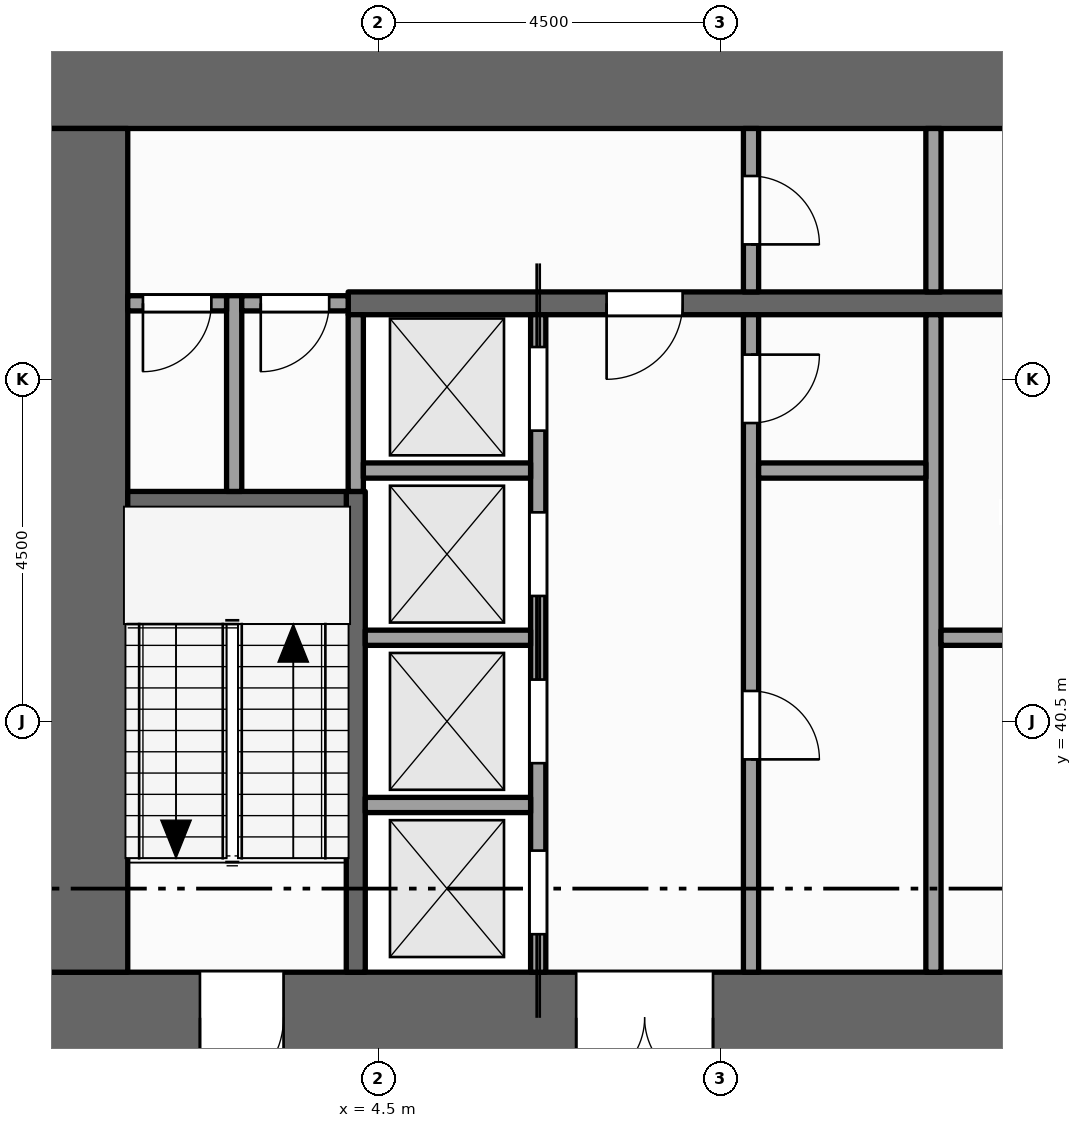
"""IFC4 building model, lengths in metres.
Left out: names, types, materials, properties, quantities, classifications, styles, units other than length and angle.
Written with IfcOpenShell. Run it as: python <this file> out.ifc"""

import sys

from ifc_helpers import new_model, si_unit, direction, frame, frame_2d, origin, place, context, subcontext, project, spatial, rectangle, extrude, element, fill, save


model = new_model("IFC4")
c1 = context("Model", 3, precision=1e-05, world=origin(), true_north=direction((0.0, 1.0)))
c2 = subcontext(c1, "Body", "Model", "MODEL_VIEW")
j1 = project(units=[si_unit("LENGTHUNIT", "METRE"), si_unit("PLANEANGLEUNIT", "RADIAN")], contexts=[c1])
p1 = place(None, origin())
s1 = spatial("IfcSite", under=j1, at=p1, CompositionType="ELEMENT")
p2 = place(p1, origin())
s2 = spatial("IfcBuilding", under=s1, at=p2, CompositionType="ELEMENT")
p3 = place(p2, frame((0.0, 0.0, 123.0)))
s3 = spatial("IfcBuildingStorey", under=s2, at=p3, CompositionType="ELEMENT", Elevation=123.0)
p4 = place(p3, frame((0.0, 36.6, -0.15), z_axis=(0.0, 0.0, 1.0), x_axis=(1.0, 0.0, 0.0)))
e1 = element("IfcWall", 1, at=p4, inside=s3, PredefinedType="SHEAR", context=c2, shape_type="SweptSolid", body=[
    extrude(rectangle(XDim=22.5, YDim=1.2, at=frame_2d((11.25, 0.0))), origin(), (0.0, 0.0, 1.0), 4.0),
])
p5 = place(p4, frame((7.1, 0.0, 0.15)))
e2 = element("IfcOpeningElement", 2, at=p5, cuts=e1, PredefinedType="OPENING", context=c2, shape_type="SweptSolid", body=[
    extrude(rectangle(XDim=1.8, YDim=2.1, at=frame_2d((0.9, 1.05))), frame((0.0, 0.61, 0.0), z_axis=(0.0, -1.0, 0.0), x_axis=(1.0, 0.0, 0.0)), (0.0, 0.0, 1.0), 1.22),
])
p6 = place(p4, frame((13.15, 0.0, 0.15)))
e3 = element("IfcOpeningElement", 3, at=p6, cuts=e1, PredefinedType="OPENING", context=c2, shape_type="SweptSolid", body=[
    extrude(rectangle(XDim=1.1, YDim=2.1, at=frame_2d((0.55, 1.05))), frame((0.0, 0.61, 0.0), z_axis=(0.0, -1.0, 0.0), x_axis=(1.0, 0.0, 0.0)), (0.0, 0.0, 1.0), 1.22),
])
p7 = place(p4, frame((2.15, 0.0, 0.15)))
e4 = element("IfcOpeningElement", 4, at=p7, cuts=e1, PredefinedType="OPENING", context=c2, shape_type="SweptSolid", body=[
    extrude(rectangle(XDim=1.1, YDim=2.1, at=frame_2d((0.55, 1.05))), frame((0.0, 0.61, 0.0), z_axis=(0.0, -1.0, 0.0), x_axis=(1.0, 0.0, 0.0)), (0.0, 0.0, 1.0), 1.22),
])
p8 = place(p4, frame((19.35, 0.0, 0.15)))
e5 = element("IfcOpeningElement", 5, at=p8, cuts=e1, PredefinedType="OPENING", context=c2, shape_type="SweptSolid", body=[
    extrude(rectangle(XDim=1.1, YDim=2.1, at=frame_2d((0.55, 1.05))), frame((0.0, 0.61, 0.0), z_axis=(0.0, -1.0, 0.0), x_axis=(1.0, 0.0, 0.0)), (0.0, 0.0, 1.0), 1.22),
])
p9 = place(p3, frame((0.0, 48.9, -0.15), z_axis=(0.0, 0.0, 1.0), x_axis=(1.0, 0.0, 0.0)))
e6 = element("IfcWall", 6, at=p9, inside=s3, PredefinedType="SHEAR", context=c2, shape_type="SweptSolid", body=[
    extrude(rectangle(XDim=22.5, YDim=1.2, at=frame_2d((11.25, 0.0))), origin(), (0.0, 0.0, 1.0), 4.0),
])
p10 = place(p3, frame((0.6, 37.2, -0.15), z_axis=(0.0, 0.0, 1.0), x_axis=(0.0, 1.0, 0.0)))
e7 = element("IfcWall", 7, at=p10, inside=s3, PredefinedType="SHEAR", context=c2, shape_type="SweptSolid", body=[
    extrude(rectangle(XDim=11.1, YDim=1.2, at=frame_2d((5.55, 0.0))), origin(), (0.0, 0.0, 1.0), 4.0),
])
p11 = place(p3, frame((2.6, 43.525, 0.0), z_axis=(0.0, 0.0, 1.0), x_axis=(0.0, 1.0, 0.0)))
e8 = element("IfcWall", 8, at=p11, inside=s3, PredefinedType="PARTITIONING", context=c2, shape_type="SweptSolid", body=[
    extrude(rectangle(XDim=2.575, YDim=0.2, at=frame_2d((1.288, 0.0))), origin(), (0.0, 0.0, 1.0), 3.85),
])
p12 = place(p3, frame((4.2, 37.2, 0.0), z_axis=(0.0, 0.0, 1.0), x_axis=(0.0, 1.0, 0.0)))
e9 = element("IfcWall", 9, at=p12, inside=s3, PredefinedType="SHEAR", context=c2, shape_type="SweptSolid", body=[
    extrude(rectangle(XDim=6.325, YDim=0.25, at=frame_2d((3.163, 0.0))), origin(), (0.0, 0.0, 1.0), 3.85),
])
p13 = place(p3, frame((4.2, 43.525, 0.0), z_axis=(0.0, 0.0, 1.0), x_axis=(0.0, 1.0, 0.0)))
e10 = element("IfcWall", 10, at=p13, inside=s3, PredefinedType="SOLIDWALL", context=c2, shape_type="SweptSolid", body=[
    extrude(rectangle(XDim=2.325, YDim=0.2, at=frame_2d((1.163, 0.0))), origin(), (0.0, 0.0, 1.0), 3.85),
])
p14 = place(p3, frame((6.6, 37.2, 0.0), z_axis=(0.0, 0.0, 1.0), x_axis=(0.0, 1.0, 0.0)))
e11 = element("IfcWall", 11, at=p14, inside=s3, PredefinedType="SOLIDWALL", context=c2, shape_type="SweptSolid", body=[
    extrude(rectangle(XDim=8.65, YDim=0.2, at=frame_2d((4.325, 0.0))), origin(), (0.0, 0.0, 1.0), 3.85),
])
p15 = place(p14, frame((0.5, 0.0, 0.012)))
e12 = element("IfcOpeningElement", 12, at=p15, cuts=e11, PredefinedType="OPENING", context=c2, shape_type="SweptSolid", body=[
    extrude(rectangle(XDim=1.1, YDim=2.1, at=frame_2d((0.55, 1.05))), frame((0.0, 0.11, 0.0), z_axis=(0.0, -1.0, 0.0), x_axis=(1.0, 0.0, 0.0)), (0.0, 0.0, 1.0), 0.22),
])
p16 = place(p14, frame((2.75, 0.0, 0.012)))
e13 = element("IfcOpeningElement", 13, at=p16, cuts=e11, PredefinedType="OPENING", context=c2, shape_type="SweptSolid", body=[
    extrude(rectangle(XDim=1.1, YDim=2.1, at=frame_2d((0.55, 1.05))), frame((0.0, 0.11, 0.0), z_axis=(0.0, -1.0, 0.0), x_axis=(1.0, 0.0, 0.0)), (0.0, 0.0, 1.0), 0.22),
])
p17 = place(p14, frame((4.95, 0.0, 0.012)))
e14 = element("IfcOpeningElement", 14, at=p17, cuts=e11, PredefinedType="OPENING", context=c2, shape_type="SweptSolid", body=[
    extrude(rectangle(XDim=1.1, YDim=2.1, at=frame_2d((0.55, 1.05))), frame((0.0, 0.11, 0.0), z_axis=(0.0, -1.0, 0.0), x_axis=(1.0, 0.0, 0.0)), (0.0, 0.0, 1.0), 0.22),
])
p18 = place(p14, frame((7.125, 0.0, 0.012)))
e15 = element("IfcOpeningElement", 15, at=p18, cuts=e11, PredefinedType="OPENING", context=c2, shape_type="SweptSolid", body=[
    extrude(rectangle(XDim=1.1, YDim=2.1, at=frame_2d((0.55, 1.05))), frame((0.0, 0.11, 0.0), z_axis=(0.0, -1.0, 0.0), x_axis=(1.0, 0.0, 0.0)), (0.0, 0.0, 1.0), 0.22),
])
p19 = place(p3, frame((9.4, 37.2, 0.0), z_axis=(0.0, 0.0, 1.0), x_axis=(0.0, 1.0, 0.0)))
e16 = element("IfcWall", 16, at=p19, inside=s3, PredefinedType="PARTITIONING", context=c2, shape_type="SweptSolid", body=[
    extrude(rectangle(XDim=8.65, YDim=0.2, at=frame_2d((4.325, 0.0))), origin(), (0.0, 0.0, 1.0), 3.85),
])
p20 = place(p19, frame((2.8, 0.0, 0.0)))
e17 = element("IfcOpeningElement", 17, at=p20, cuts=e16, PredefinedType="OPENING", context=c2, shape_type="SweptSolid", body=[
    extrude(rectangle(XDim=0.9, YDim=2.1, at=frame_2d((0.45, 1.05))), frame((0.0, 0.11, 0.0), z_axis=(0.0, -1.0, 0.0), x_axis=(1.0, 0.0, 0.0)), (0.0, 0.0, 1.0), 0.22),
])
p21 = place(p19, frame((7.225, 0.0, 0.0)))
e18 = element("IfcOpeningElement", 18, at=p21, cuts=e16, PredefinedType="OPENING", context=c2, shape_type="SweptSolid", body=[
    extrude(rectangle(XDim=0.9, YDim=2.1, at=frame_2d((0.45, 1.05))), frame((0.0, 0.11, 0.0), z_axis=(0.0, -1.0, 0.0), x_axis=(1.0, 0.0, 0.0)), (0.0, 0.0, 1.0), 0.22),
])
p22 = place(p3, frame((9.4, 46.15, 0.0), z_axis=(0.0, 0.0, 1.0), x_axis=(0.0, 1.0, 0.0)))
e19 = element("IfcWall", 19, at=p22, inside=s3, PredefinedType="PARTITIONING", context=c2, shape_type="SweptSolid", body=[
    extrude(rectangle(XDim=2.15, YDim=0.2, at=frame_2d((1.075, 0.0))), origin(), (0.0, 0.0, 1.0), 3.85),
])
p23 = place(p22, frame((0.625, 0.0, 0.0)))
e20 = element("IfcOpeningElement", 20, at=p23, cuts=e19, PredefinedType="OPENING", context=c2, shape_type="SweptSolid", body=[
    extrude(rectangle(XDim=0.9, YDim=2.1, at=frame_2d((0.45, 1.05))), frame((0.0, 0.11, 0.0), z_axis=(0.0, -1.0, 0.0), x_axis=(1.0, 0.0, 0.0)), (0.0, 0.0, 1.0), 0.22),
])
p24 = place(p3, frame((11.8, 37.2, 0.0), z_axis=(0.0, 0.0, 1.0), x_axis=(0.0, 1.0, 0.0)))
e21 = element("IfcWall", 21, at=p24, inside=s3, PredefinedType="PARTITIONING", context=c2, shape_type="SweptSolid", body=[
    extrude(rectangle(XDim=8.65, YDim=0.2, at=frame_2d((4.325, 0.0))), origin(), (0.0, 0.0, 1.0), 3.85),
])
p25 = place(p3, frame((11.8, 46.15, 0.0), z_axis=(0.0, 0.0, 1.0), x_axis=(0.0, 1.0, 0.0)))
e22 = element("IfcWall", 22, at=p25, inside=s3, PredefinedType="PARTITIONING", context=c2, shape_type="SweptSolid", body=[
    extrude(rectangle(XDim=2.15, YDim=0.2, at=frame_2d((1.075, 0.0))), origin(), (0.0, 0.0, 1.0), 3.85),
])
for number, where, z_axis, x_axis in (
    (23, (4.325, 39.4, 0.0), (0.0, 0.0, 1.0), (1.0, 0.0, 0.0)),
    (24, (4.325, 41.6, 0.0), (0.0, 0.0, 1.0), (1.0, 0.0, 0.0)),
):
    element("IfcWall", number, at=place(p3, frame(where, z_axis=z_axis, x_axis=x_axis)), inside=s3, PredefinedType="SOLIDWALL", context=c2, shape_type="SweptSolid", body=[
        extrude(rectangle(XDim=2.175, YDim=0.2, at=frame_2d((1.087, 0.0))), origin(), (0.0, 0.0, 1.0), 3.85),
    ])
p26 = place(p3, frame((11.9, 41.6, 0.0), z_axis=(0.0, 0.0, 1.0), x_axis=(1.0, 0.0, 0.0)))
e25 = element("IfcWall", 25, at=p26, inside=s3, PredefinedType="PARTITIONING", context=c2, shape_type="SweptSolid", body=[
    extrude(rectangle(XDim=3.6, YDim=0.2, at=frame_2d((1.8, 0.0))), origin(), (0.0, 0.0, 1.0), 3.85),
])
p27 = place(p26, frame((1.3, 0.0, 0.0)))
e26 = element("IfcOpeningElement", 26, at=p27, cuts=e25, PredefinedType="OPENING", context=c2, shape_type="SweptSolid", body=[
    extrude(rectangle(XDim=1.0, YDim=2.1, at=frame_2d((0.5, 1.05))), frame((0.0, 0.11, 0.0), z_axis=(0.0, -1.0, 0.0), x_axis=(1.0, 0.0, 0.0)), (0.0, 0.0, 1.0), 0.22),
])
p28 = place(p3, frame((1.2, 43.4, 0.0), z_axis=(0.0, 0.0, 1.0), x_axis=(1.0, 0.0, 0.0)))
e27 = element("IfcWall", 27, at=p28, inside=s3, PredefinedType="SHEAR", context=c2, shape_type="SweptSolid", body=[
    extrude(rectangle(XDim=2.875, YDim=0.25, at=frame_2d((1.438, 0.0))), origin(), (0.0, 0.0, 1.0), 3.85),
])
p29 = place(p3, frame((4.3, 43.8, 0.0), z_axis=(0.0, 0.0, 1.0), x_axis=(1.0, 0.0, 0.0)))
e28 = element("IfcWall", 28, at=p29, inside=s3, PredefinedType="SOLIDWALL", context=c2, shape_type="SweptSolid", body=[
    extrude(rectangle(XDim=2.2, YDim=0.2, at=frame_2d((1.1, 0.0))), origin(), (0.0, 0.0, 1.0), 3.85),
])
p30 = place(p3, frame((9.5, 43.8, 0.0), z_axis=(0.0, 0.0, 1.0), x_axis=(1.0, 0.0, 0.0)))
e29 = element("IfcWall", 29, at=p30, inside=s3, PredefinedType="PARTITIONING", context=c2, shape_type="SweptSolid", body=[
    extrude(rectangle(XDim=2.2, YDim=0.2, at=frame_2d((1.1, 0.0))), origin(), (0.0, 0.0, 1.0), 3.85),
])
p31 = place(p3, frame((1.2, 46.0, 0.0), z_axis=(0.0, 0.0, 1.0), x_axis=(1.0, 0.0, 0.0)))
e30 = element("IfcWall", 30, at=p31, inside=s3, PredefinedType="PARTITIONING", context=c2, shape_type="SweptSolid", body=[
    extrude(rectangle(XDim=1.3, YDim=0.2, at=frame_2d((0.65, 0.0))), origin(), (0.0, 0.0, 1.0), 3.85),
])
p32 = place(p31, frame((0.2, 0.0, 0.0)))
e31 = element("IfcOpeningElement", 31, at=p32, cuts=e30, PredefinedType="OPENING", context=c2, shape_type="SweptSolid", body=[
    extrude(rectangle(XDim=0.9, YDim=2.1, at=frame_2d((0.45, 1.05))), frame((0.0, 0.11, 0.0), z_axis=(0.0, -1.0, 0.0), x_axis=(1.0, 0.0, 0.0)), (0.0, 0.0, 1.0), 0.22),
])
p33 = place(p3, frame((2.7, 46.0, 0.0), z_axis=(0.0, 0.0, 1.0), x_axis=(1.0, 0.0, 0.0)))
e32 = element("IfcWall", 32, at=p33, inside=s3, PredefinedType="PARTITIONING", context=c2, shape_type="SweptSolid", body=[
    extrude(rectangle(XDim=1.4, YDim=0.2, at=frame_2d((0.7, 0.0))), origin(), (0.0, 0.0, 1.0), 3.85),
])
p34 = place(p33, frame((0.25, 0.0, 0.0)))
e33 = element("IfcOpeningElement", 33, at=p34, cuts=e32, PredefinedType="OPENING", context=c2, shape_type="SweptSolid", body=[
    extrude(rectangle(XDim=0.9, YDim=2.1, at=frame_2d((0.45, 1.05))), frame((0.0, 0.11, 0.0), z_axis=(0.0, -1.0, 0.0), x_axis=(1.0, 0.0, 0.0)), (0.0, 0.0, 1.0), 0.22),
])
p35 = place(p3, frame((4.1, 46.0, 0.0), z_axis=(0.0, 0.0, 1.0), x_axis=(1.0, 0.0, 0.0)))
e34 = element("IfcWall", 34, at=p35, inside=s3, PredefinedType="SHEAR", context=c2, shape_type="SweptSolid", body=[
    extrude(rectangle(XDim=14.5, YDim=0.3, at=frame_2d((7.25, 0.0))), origin(), (0.0, 0.0, 1.0), 3.85),
])
p36 = place(p35, frame((3.4, 0.0, 0.0)))
e35 = element("IfcOpeningElement", 35, at=p36, cuts=e34, PredefinedType="OPENING", context=c2, shape_type="SweptSolid", body=[
    extrude(rectangle(XDim=1.0, YDim=2.1, at=frame_2d((0.5, 1.05))), frame((0.0, 0.16, 0.0), z_axis=(0.0, -1.0, 0.0), x_axis=(1.0, 0.0, 0.0)), (0.0, 0.0, 1.0), 0.32),
])
p37 = place(p35, frame((9.1, 0.0, 0.0)))
e36 = element("IfcOpeningElement", 36, at=p37, cuts=e34, PredefinedType="OPENING", context=c2, shape_type="SweptSolid", body=[
    extrude(rectangle(XDim=1.0, YDim=2.1, at=frame_2d((0.5, 1.05))), frame((0.0, 0.16, 0.0), z_axis=(0.0, -1.0, 0.0), x_axis=(1.0, 0.0, 0.0)), (0.0, 0.0, 1.0), 0.32),
])
p38 = place(p15, origin())
e37 = element("IfcDoor", 37, at=p38, inside=s3, OperationType="SLIDING_TO_LEFT", PredefinedType="DOOR", context=c2, shape_type="SweptSolid", body=[
    extrude(rectangle(XDim=1.1, YDim=2.1, at=frame_2d((0.55, 1.05))), frame((0.0, 0.025, 0.0), z_axis=(0.0, -1.0, 0.0), x_axis=(1.0, 0.0, 0.0)), (0.0, 0.0, 1.0), 0.05),
])
fill(e12, e37)
p39 = place(p16, origin())
e38 = element("IfcDoor", 38, at=p39, inside=s3, OperationType="SLIDING_TO_RIGHT", PredefinedType="DOOR", context=c2, shape_type="SweptSolid", body=[
    extrude(rectangle(XDim=1.1, YDim=2.1, at=frame_2d((0.55, 1.05))), frame((0.0, 0.025, 0.0), z_axis=(0.0, -1.0, 0.0), x_axis=(1.0, 0.0, 0.0)), (0.0, 0.0, 1.0), 0.05),
])
fill(e13, e38)
p40 = place(p17, origin())
e39 = element("IfcDoor", 39, at=p40, inside=s3, OperationType="SLIDING_TO_LEFT", PredefinedType="DOOR", context=c2, shape_type="SweptSolid", body=[
    extrude(rectangle(XDim=1.1, YDim=2.1, at=frame_2d((0.55, 1.05))), frame((0.0, 0.025, 0.0), z_axis=(0.0, -1.0, 0.0), x_axis=(1.0, 0.0, 0.0)), (0.0, 0.0, 1.0), 0.05),
])
fill(e14, e39)
p41 = place(p18, origin())
e40 = element("IfcDoor", 40, at=p41, inside=s3, OperationType="SLIDING_TO_RIGHT", PredefinedType="DOOR", context=c2, shape_type="SweptSolid", body=[
    extrude(rectangle(XDim=1.1, YDim=2.1, at=frame_2d((0.55, 1.05))), frame((0.0, 0.025, 0.0), z_axis=(0.0, -1.0, 0.0), x_axis=(1.0, 0.0, 0.0)), (0.0, 0.0, 1.0), 0.05),
])
fill(e15, e40)
p42 = place(p5, origin())
e41 = element("IfcDoor", 41, at=p42, inside=s3, OperationType="DOUBLE_DOOR_SINGLE_SWING", PredefinedType="DOOR", context=c2, shape_type="SweptSolid", body=[
    extrude(rectangle(XDim=1.8, YDim=2.1, at=frame_2d((0.9, 1.05))), frame((0.0, 0.025, 0.0), z_axis=(0.0, -1.0, 0.0), x_axis=(1.0, 0.0, 0.0)), (0.0, 0.0, 1.0), 0.05),
])
fill(e2, e41)
p43 = place(p36, origin())
e42 = element("IfcDoor", 42, at=p43, inside=s3, OperationType="SINGLE_SWING_LEFT", PredefinedType="DOOR", context=c2, shape_type="SweptSolid", body=[
    extrude(rectangle(XDim=1.0, YDim=2.1, at=frame_2d((0.5, 1.05))), frame((0.0, 0.025, 0.0), z_axis=(0.0, -1.0, 0.0), x_axis=(1.0, 0.0, 0.0)), (0.0, 0.0, 1.0), 0.05),
])
fill(e35, e42)
p44 = place(p23, origin())
e43 = element("IfcDoor", 43, at=p44, inside=s3, OperationType="SINGLE_SWING_LEFT", PredefinedType="DOOR", context=c2, shape_type="SweptSolid", body=[
    extrude(rectangle(XDim=0.9, YDim=2.1, at=frame_2d((0.45, 1.05))), frame((0.0, 0.025, 0.0), z_axis=(0.0, -1.0, 0.0), x_axis=(1.0, 0.0, 0.0)), (0.0, 0.0, 1.0), 0.05),
])
fill(e20, e43)
p45 = place(p7, origin())
e44 = element("IfcDoor", 44, at=p45, inside=s3, OperationType="SINGLE_SWING_LEFT", PredefinedType="DOOR", context=c2, shape_type="SweptSolid", body=[
    extrude(rectangle(XDim=1.1, YDim=2.1, at=frame_2d((0.55, 1.05))), frame((0.0, 0.025, 0.0), z_axis=(0.0, -1.0, 0.0), x_axis=(1.0, 0.0, 0.0)), (0.0, 0.0, 1.0), 0.05),
])
fill(e4, e44)
p46 = place(p32, origin())
e45 = element("IfcDoor", 45, at=p46, inside=s3, OperationType="SINGLE_SWING_LEFT", PredefinedType="DOOR", context=c2, shape_type="SweptSolid", body=[
    extrude(rectangle(XDim=0.9, YDim=2.1, at=frame_2d((0.45, 1.05))), frame((0.0, 0.025, 0.0), z_axis=(0.0, -1.0, 0.0), x_axis=(1.0, 0.0, 0.0)), (0.0, 0.0, 1.0), 0.05),
])
fill(e31, e45)
p47 = place(p34, origin())
e46 = element("IfcDoor", 46, at=p47, inside=s3, OperationType="SINGLE_SWING_LEFT", PredefinedType="DOOR", context=c2, shape_type="SweptSolid", body=[
    extrude(rectangle(XDim=0.9, YDim=2.1, at=frame_2d((0.45, 1.05))), frame((0.0, 0.025, 0.0), z_axis=(0.0, -1.0, 0.0), x_axis=(1.0, 0.0, 0.0)), (0.0, 0.0, 1.0), 0.05),
])
fill(e33, e46)
p48 = place(p20, origin())
e47 = element("IfcDoor", 47, at=p48, inside=s3, OperationType="SINGLE_SWING_LEFT", PredefinedType="DOOR", context=c2, shape_type="SweptSolid", body=[
    extrude(rectangle(XDim=0.9, YDim=2.1, at=frame_2d((0.45, 1.05))), frame((0.0, 0.025, 0.0), z_axis=(0.0, -1.0, 0.0), x_axis=(1.0, 0.0, 0.0)), (0.0, 0.0, 1.0), 0.05),
])
fill(e17, e47)
p49 = place(p21, origin())
e48 = element("IfcDoor", 48, at=p49, inside=s3, OperationType="SINGLE_SWING_RIGHT", PredefinedType="DOOR", context=c2, shape_type="SweptSolid", body=[
    extrude(rectangle(XDim=0.9, YDim=2.1, at=frame_2d((0.45, 1.05))), frame((0.0, 0.025, 0.0), z_axis=(0.0, -1.0, 0.0), x_axis=(1.0, 0.0, 0.0)), (0.0, 0.0, 1.0), 0.05),
])
fill(e18, e48)
save(model, sys.argv[1])
